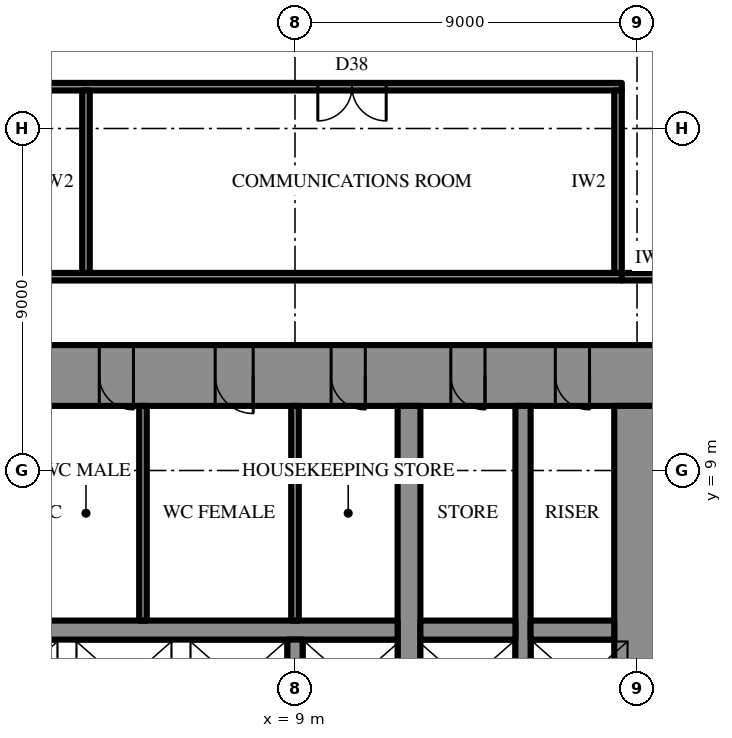
"""IFC4 building model, lengths in metres.
Left out: names, types, materials, properties, quantities, classifications, styles, units other than length and angle.
Written with IfcOpenShell. Run it as: python <this file> out.ifc"""

import sys

from ifc_helpers import new_model, si_unit, direction, frame, frame_2d, origin, place, context, subcontext, project, spatial, rectangle, extrude, element, fill, save


model = new_model("IFC4")
c1 = context("Model", 3, precision=1e-05, world=origin(), true_north=direction((0.0, 1.0)))
c2 = subcontext(c1, "Body", "Model", "MODEL_VIEW")
j1 = project(units=[si_unit("LENGTHUNIT", "METRE"), si_unit("PLANEANGLEUNIT", "RADIAN")], contexts=[c1])
p1 = place(None, origin())
s1 = spatial("IfcSite", under=j1, at=p1, CompositionType="ELEMENT")
p2 = place(p1, origin())
s2 = spatial("IfcBuilding", under=s1, at=p2, CompositionType="ELEMENT")
p3 = place(p2, frame((0.0, 0.0, 40.3)))
s3 = spatial("IfcBuildingStorey", under=s2, at=p3, CompositionType="ELEMENT", Elevation=40.3)
p4 = place(p3, frame((-18.6, 11.5, 0.0), z_axis=(0.0, 0.0, 1.0), x_axis=(1.0, 0.0, 0.0)))
e1 = element("IfcWall", 1, at=p4, inside=s3, PredefinedType="SHEAR", context=c2, shape_type="SweptSolid", body=[
    extrude(rectangle(XDim=37.2, YDim=1.6, at=frame_2d((18.6, 0.0))), origin(), (0.0, 0.0, 1.0), 4.2),
])
p5 = place(p4, frame((19.45, 0.0, 0.0)))
e2 = element("IfcOpeningElement", 2, at=p5, cuts=e1, PredefinedType="OPENING", context=c2, shape_type="SweptSolid", body=[
    extrude(rectangle(XDim=0.9, YDim=2.2, at=frame_2d((0.45, 1.1))), frame((0.0, 0.81, 0.0), z_axis=(0.0, -1.0, 0.0), x_axis=(1.0, 0.0, 0.0)), (0.0, 0.0, 1.0), 1.62),
])
p6 = place(p4, frame((22.45, 0.0, 0.0)))
e3 = element("IfcOpeningElement", 3, at=p6, cuts=e1, PredefinedType="OPENING", context=c2, shape_type="SweptSolid", body=[
    extrude(rectangle(XDim=0.9, YDim=2.2, at=frame_2d((0.45, 1.1))), frame((0.0, 0.81, 0.0), z_axis=(0.0, -1.0, 0.0), x_axis=(1.0, 0.0, 0.0)), (0.0, 0.0, 1.0), 1.62),
])
p7 = place(p4, frame((25.5, 0.0, 0.0)))
e4 = element("IfcOpeningElement", 4, at=p7, cuts=e1, PredefinedType="OPENING", context=c2, shape_type="SweptSolid", body=[
    extrude(rectangle(XDim=1.0, YDim=2.2, at=frame_2d((0.5, 1.1))), frame((0.0, 0.81, 0.0), z_axis=(0.0, -1.0, 0.0), x_axis=(1.0, 0.0, 0.0)), (0.0, 0.0, 1.0), 1.62),
])
p8 = place(p4, frame((1.85, 0.0, 0.0)))
e5 = element("IfcOpeningElement", 5, at=p8, cuts=e1, PredefinedType="OPENING", context=c2, shape_type="SweptSolid", body=[
    extrude(rectangle(XDim=0.9, YDim=2.2, at=frame_2d((0.45, 1.1))), frame((0.0, 0.81, 0.0), z_axis=(0.0, -1.0, 0.0), x_axis=(1.0, 0.0, 0.0)), (0.0, 0.0, 1.0), 1.62),
])
p9 = place(p4, frame((4.6, 0.0, 0.0)))
e6 = element("IfcOpeningElement", 6, at=p9, cuts=e1, PredefinedType="OPENING", context=c2, shape_type="SweptSolid", body=[
    extrude(rectangle(XDim=0.9, YDim=2.2, at=frame_2d((0.45, 1.1))), frame((0.0, 0.81, 0.0), z_axis=(0.0, -1.0, 0.0), x_axis=(1.0, 0.0, 0.0)), (0.0, 0.0, 1.0), 1.62),
])
p10 = place(p4, frame((7.75, 0.0, 0.0)))
e7 = element("IfcOpeningElement", 7, at=p10, cuts=e1, PredefinedType="OPENING", context=c2, shape_type="SweptSolid", body=[
    extrude(rectangle(XDim=0.9, YDim=2.2, at=frame_2d((0.45, 1.1))), frame((0.0, 0.81, 0.0), z_axis=(0.0, -1.0, 0.0), x_axis=(1.0, 0.0, 0.0)), (0.0, 0.0, 1.0), 1.62),
])
p11 = place(p4, frame((28.55, 0.0, 0.0)))
e8 = element("IfcOpeningElement", 8, at=p11, cuts=e1, PredefinedType="OPENING", context=c2, shape_type="SweptSolid", body=[
    extrude(rectangle(XDim=0.9, YDim=2.2, at=frame_2d((0.45, 1.1))), frame((0.0, 0.81, 0.0), z_axis=(0.0, -1.0, 0.0), x_axis=(1.0, 0.0, 0.0)), (0.0, 0.0, 1.0), 1.62),
])
p12 = place(p4, frame((31.7, 0.0, 0.0)))
e9 = element("IfcOpeningElement", 9, at=p12, cuts=e1, PredefinedType="OPENING", context=c2, shape_type="SweptSolid", body=[
    extrude(rectangle(XDim=0.9, YDim=2.2, at=frame_2d((0.45, 1.1))), frame((0.0, 0.81, 0.0), z_axis=(0.0, -1.0, 0.0), x_axis=(1.0, 0.0, 0.0)), (0.0, 0.0, 1.0), 1.62),
])
p13 = place(p4, frame((34.45, 0.0, 0.0)))
e10 = element("IfcOpeningElement", 10, at=p13, cuts=e1, PredefinedType="OPENING", context=c2, shape_type="SweptSolid", body=[
    extrude(rectangle(XDim=0.9, YDim=2.2, at=frame_2d((0.45, 1.1))), frame((0.0, 0.81, 0.0), z_axis=(0.0, -1.0, 0.0), x_axis=(1.0, 0.0, 0.0)), (0.0, 0.0, 1.0), 1.62),
])
p14 = place(p3, frame((18.0, -10.7, 0.0), z_axis=(0.0, 0.0, 1.0), x_axis=(0.0, 1.0, 0.0)))
e11 = element("IfcWall", 11, at=p14, inside=s3, PredefinedType="SHEAR", context=c2, shape_type="SweptSolid", body=[
    extrude(rectangle(XDim=21.4, YDim=1.2, at=frame_2d((10.7, 0.0))), origin(), (0.0, 0.0, 1.0), 4.2),
])
p15 = place(p14, frame((9.8, 0.0, 0.0)))
e12 = element("IfcOpeningElement", 12, at=p15, cuts=e11, PredefinedType="OPENING", context=c2, shape_type="SweptSolid", body=[
    extrude(rectangle(XDim=1.8, YDim=2.4, at=frame_2d((0.9, 1.2))), frame((0.0, 0.61, 0.0), z_axis=(0.0, -1.0, 0.0), x_axis=(1.0, 0.0, 0.0)), (0.0, 0.0, 1.0), 1.22),
])
p16 = place(p3, frame((12.0, -10.7, 0.0), z_axis=(0.0, 0.0, 1.0), x_axis=(0.0, 1.0, 0.0)))
e13 = element("IfcWall", 13, at=p16, inside=s3, PredefinedType="SHEAR", context=c2, shape_type="SweptSolid", body=[
    extrude(rectangle(XDim=21.4, YDim=0.6, at=frame_2d((10.7, 0.0))), origin(), (0.0, 0.0, 1.0), 4.2),
])
p17 = place(p16, frame((9.8, 0.0, 0.0)))
e14 = element("IfcOpeningElement", 14, at=p17, cuts=e13, PredefinedType="OPENING", context=c2, shape_type="SweptSolid", body=[
    extrude(rectangle(XDim=1.8, YDim=2.4, at=frame_2d((0.9, 1.2))), frame((0.0, 0.31, 0.0), z_axis=(0.0, -1.0, 0.0), x_axis=(1.0, 0.0, 0.0)), (0.0, 0.0, 1.0), 0.62),
])
p18 = place(p3, frame((15.0, -10.7, 0.0), z_axis=(0.0, 0.0, 1.0), x_axis=(0.0, 1.0, 0.0)))
e15 = element("IfcWall", 15, at=p18, inside=s3, PredefinedType="SHEAR", context=c2, shape_type="SweptSolid", body=[
    extrude(rectangle(XDim=21.4, YDim=0.4, at=frame_2d((10.7, 0.0))), origin(), (0.0, 0.0, 1.0), 4.2),
])
p19 = place(p18, frame((9.8, 0.0, 0.0)))
e16 = element("IfcOpeningElement", 16, at=p19, cuts=e15, PredefinedType="OPENING", context=c2, shape_type="SweptSolid", body=[
    extrude(rectangle(XDim=1.8, YDim=2.4, at=frame_2d((0.9, 1.2))), frame((0.0, 0.21, 0.0), z_axis=(0.0, -1.0, 0.0), x_axis=(1.0, 0.0, 0.0)), (0.0, 0.0, 1.0), 0.42),
])
p20 = place(p3, frame((-11.7, 4.8, 0.0), z_axis=(0.0, 0.0, 1.0), x_axis=(1.0, 0.0, 0.0)))
e17 = element("IfcWall", 17, at=p20, inside=s3, PredefinedType="SHEAR", context=c2, shape_type="SweptSolid", body=[
    extrude(rectangle(XDim=23.4, YDim=0.5, at=frame_2d((11.7, 0.0))), origin(), (0.0, 0.0, 1.0), 4.2),
])
p21 = place(p20, frame((6.6, 0.0, 0.0)))
e18 = element("IfcOpeningElement", 18, at=p21, cuts=e17, PredefinedType="OPENING", context=c2, shape_type="SweptSolid", body=[
    extrude(rectangle(XDim=1.2, YDim=2.2, at=frame_2d((0.6, 1.1))), frame((0.0, 0.26, 0.0), z_axis=(0.0, -1.0, 0.0), x_axis=(1.0, 0.0, 0.0)), (0.0, 0.0, 1.0), 0.52),
])
p22 = place(p20, frame((3.6, 0.0, 0.0)))
e19 = element("IfcOpeningElement", 19, at=p22, cuts=e17, PredefinedType="OPENING", context=c2, shape_type="SweptSolid", body=[
    extrude(rectangle(XDim=1.2, YDim=2.2, at=frame_2d((0.6, 1.1))), frame((0.0, 0.26, 0.0), z_axis=(0.0, -1.0, 0.0), x_axis=(1.0, 0.0, 0.0)), (0.0, 0.0, 1.0), 0.52),
])
p23 = place(p3, frame((12.3, 4.8, 0.0), z_axis=(0.0, 0.0, 1.0), x_axis=(1.0, 0.0, 0.0)))
e20 = element("IfcWall", 20, at=p23, inside=s3, PredefinedType="SHEAR", context=c2, shape_type="SweptSolid", body=[
    extrude(rectangle(XDim=2.5, YDim=0.5, at=frame_2d((1.25, 0.0))), origin(), (0.0, 0.0, 1.0), 4.2),
])
p24 = place(p3, frame((15.2, 4.8, 0.0), z_axis=(0.0, 0.0, 1.0), x_axis=(1.0, 0.0, 0.0)))
e21 = element("IfcWall", 21, at=p24, inside=s3, PredefinedType="SHEAR", context=c2, shape_type="SweptSolid", body=[
    extrude(rectangle(XDim=2.2, YDim=0.5, at=frame_2d((1.1, 0.0))), origin(), (0.0, 0.0, 1.0), 4.2),
])
p25 = place(p3, frame((9.0, 2.25, 0.0), z_axis=(0.0, 0.0, 1.0), x_axis=(0.0, 1.0, 0.0)))
e22 = element("IfcWall", 22, at=p25, inside=s3, PredefinedType="SHEAR", context=c2, shape_type="SweptSolid", body=[
    extrude(rectangle(XDim=2.3, YDim=0.4, at=frame_2d((1.15, 0.0))), origin(), (0.0, 0.0, 1.0), 4.2),
])
for number, where, z_axis, x_axis in (
    (23, (9.0, 5.05, 0.0), (0.0, 0.0, 1.0), (0.0, 1.0, 0.0)),
    (24, (5.0, 5.05, 0.0), (0.0, 0.0, 1.0), (0.0, 1.0, 0.0)),
):
    element("IfcWall", number, at=place(p3, frame(where, z_axis=z_axis, x_axis=x_axis)), inside=s3, PredefinedType="PARTITIONING", context=c2, shape_type="SweptSolid", body=[
        extrude(rectangle(XDim=5.65, YDim=0.2, at=frame_2d((2.825, 0.0))), origin(), (0.0, 0.0, 1.0), 4.0),
    ])
p26 = place(p3, frame((-17.6, 14.1, 0.0), z_axis=(0.0, 0.0, 1.0), x_axis=(1.0, 0.0, 0.0)))
e25 = element("IfcWall", 25, at=p26, inside=s3, PredefinedType="PARTITIONING", context=c2, shape_type="SweptSolid", body=[
    extrude(rectangle(XDim=35.2, YDim=0.2, at=frame_2d((17.6, 0.0))), origin(), (0.0, 0.0, 1.0), 4.0),
])
p27 = place(p3, frame((-17.6, 19.1, 0.0), z_axis=(0.0, 0.0, 1.0), x_axis=(1.0, 0.0, 0.0)))
e26 = element("IfcWall", 26, at=p27, inside=s3, PredefinedType="PARTITIONING", context=c2, shape_type="SweptSolid", body=[
    extrude(rectangle(XDim=35.2, YDim=0.2, at=frame_2d((17.6, 0.0))), origin(), (0.0, 0.0, 1.0), 4.0),
])
p28 = place(p27, frame((9.7, 0.0, 0.0)))
e27 = element("IfcOpeningElement", 27, at=p28, cuts=e26, PredefinedType="OPENING", context=c2, shape_type="SweptSolid", body=[
    extrude(rectangle(XDim=1.8, YDim=2.4, at=frame_2d((0.9, 1.2))), frame((0.0, 0.11, 0.0), z_axis=(0.0, -1.0, 0.0), x_axis=(1.0, 0.0, 0.0)), (0.0, 0.0, 1.0), 0.22),
])
p29 = place(p27, frame((27.2, 0.0, 0.0)))
e28 = element("IfcOpeningElement", 28, at=p29, cuts=e26, PredefinedType="OPENING", context=c2, shape_type="SweptSolid", body=[
    extrude(rectangle(XDim=1.8, YDim=2.4, at=frame_2d((0.9, 1.2))), frame((0.0, 0.11, 0.0), z_axis=(0.0, -1.0, 0.0), x_axis=(1.0, 0.0, 0.0)), (0.0, 0.0, 1.0), 0.22),
])
for number, where, z_axis, x_axis in (
    (29, (3.5, 14.2, 0.0), (0.0, 0.0, 1.0), (0.0, 1.0, 0.0)),
    (30, (17.5, 14.2, 0.0), (0.0, 0.0, 1.0), (0.0, 1.0, 0.0)),
):
    element("IfcWall", number, at=place(p3, frame(where, z_axis=z_axis, x_axis=x_axis)), inside=s3, PredefinedType="PARTITIONING", context=c2, shape_type="SweptSolid", body=[
        extrude(rectangle(XDim=4.8, YDim=0.2, at=frame_2d((2.4, 0.0))), origin(), (0.0, 0.0, 1.0), 4.0),
    ])
p30 = place(p3, frame((17.6, 14.1, 0.0), z_axis=(0.0, 0.0, 1.0), x_axis=(1.0, 0.0, 0.0)))
e31 = element("IfcWall", 31, at=p30, inside=s3, PredefinedType="PARTITIONING", context=c2, shape_type="SweptSolid", body=[
    extrude(rectangle(XDim=1.6, YDim=0.2, at=frame_2d((0.8, 0.0))), origin(), (0.0, 0.0, 1.0), 4.0),
])
p31 = place(p6, frame((0.9, 0.0, 0.0), z_axis=(0.0, 0.0, 1.0), x_axis=(-1.0, 0.0, 0.0)))
e32 = element("IfcDoor", 32, at=p31, inside=s3, OperationType="SINGLE_SWING_RIGHT", PredefinedType="DOOR", context=c2, shape_type="SweptSolid", body=[
    extrude(rectangle(XDim=0.9, YDim=2.2, at=frame_2d((0.45, 1.1))), frame((0.0, 0.025, 0.0), z_axis=(0.0, -1.0, 0.0), x_axis=(1.0, 0.0, 0.0)), (0.0, 0.0, 1.0), 0.05),
])
fill(e3, e32)
p32 = place(p7, frame((1.0, 0.0, 0.0), z_axis=(0.0, 0.0, 1.0), x_axis=(-1.0, 0.0, 0.0)))
e33 = element("IfcDoor", 33, at=p32, inside=s3, OperationType="SINGLE_SWING_RIGHT", PredefinedType="DOOR", context=c2, shape_type="SweptSolid", body=[
    extrude(rectangle(XDim=1.0, YDim=2.2, at=frame_2d((0.5, 1.1))), frame((0.0, 0.025, 0.0), z_axis=(0.0, -1.0, 0.0), x_axis=(1.0, 0.0, 0.0)), (0.0, 0.0, 1.0), 0.05),
])
fill(e4, e33)
p33 = place(p11, frame((0.9, 0.0, 0.0), z_axis=(0.0, 0.0, 1.0), x_axis=(-1.0, 0.0, 0.0)))
e34 = element("IfcDoor", 34, at=p33, inside=s3, OperationType="SINGLE_SWING_RIGHT", PredefinedType="DOOR", context=c2, shape_type="SweptSolid", body=[
    extrude(rectangle(XDim=0.9, YDim=2.2, at=frame_2d((0.45, 1.1))), frame((0.0, 0.025, 0.0), z_axis=(0.0, -1.0, 0.0), x_axis=(1.0, 0.0, 0.0)), (0.0, 0.0, 1.0), 0.05),
])
fill(e8, e34)
p34 = place(p12, frame((0.9, 0.0, 0.0), z_axis=(0.0, 0.0, 1.0), x_axis=(-1.0, 0.0, 0.0)))
e35 = element("IfcDoor", 35, at=p34, inside=s3, OperationType="SINGLE_SWING_RIGHT", PredefinedType="DOOR", context=c2, shape_type="SweptSolid", body=[
    extrude(rectangle(XDim=0.9, YDim=2.2, at=frame_2d((0.45, 1.1))), frame((0.0, 0.025, 0.0), z_axis=(0.0, -1.0, 0.0), x_axis=(1.0, 0.0, 0.0)), (0.0, 0.0, 1.0), 0.05),
])
fill(e9, e35)
p35 = place(p13, frame((0.9, 0.0, 0.0), z_axis=(0.0, 0.0, 1.0), x_axis=(-1.0, 0.0, 0.0)))
e36 = element("IfcDoor", 36, at=p35, inside=s3, OperationType="SINGLE_SWING_RIGHT", PredefinedType="DOOR", context=c2, shape_type="SweptSolid", body=[
    extrude(rectangle(XDim=0.9, YDim=2.2, at=frame_2d((0.45, 1.1))), frame((0.0, 0.025, 0.0), z_axis=(0.0, -1.0, 0.0), x_axis=(1.0, 0.0, 0.0)), (0.0, 0.0, 1.0), 0.05),
])
fill(e10, e36)
p36 = place(p29, frame((1.8, 0.0, 0.0), z_axis=(0.0, 0.0, 1.0), x_axis=(-1.0, 0.0, 0.0)))
e37 = element("IfcDoor", 37, at=p36, inside=s3, OperationType="DOUBLE_DOOR_SINGLE_SWING", PredefinedType="DOOR", context=c2, shape_type="SweptSolid", body=[
    extrude(rectangle(XDim=1.8, YDim=2.4, at=frame_2d((0.9, 1.2))), frame((0.0, 0.025, 0.0), z_axis=(0.0, -1.0, 0.0), x_axis=(1.0, 0.0, 0.0)), (0.0, 0.0, 1.0), 0.05),
])
fill(e28, e37)
save(model, sys.argv[1])
